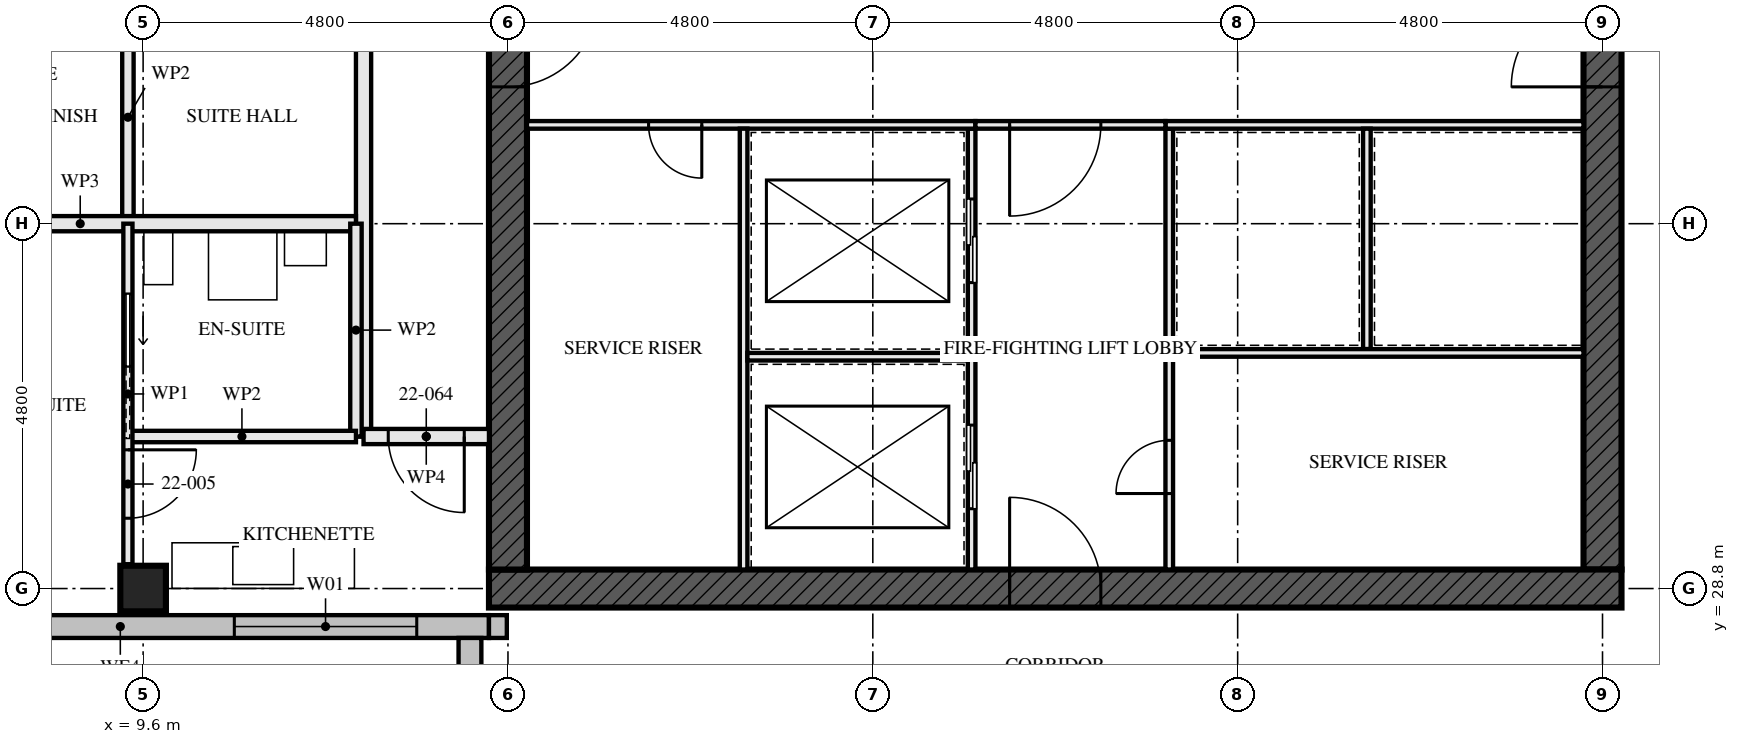
"""IFC4 building model, lengths in metres.
Left out: names, types, materials, properties, quantities, classifications, styles, units other than length and angle.
Written with IfcOpenShell. Run it as: python <this file> out.ifc"""

import sys

from ifc_helpers import new_model, si_unit, direction, frame, frame_2d, origin, origin_2d, place, context, subcontext, project, spatial, rectangle, hollow_rectangle, extrude, element, fill, save


model = new_model("IFC4")
c1 = context("Model", 3, precision=1e-05, world=origin(), true_north=direction((0.0, 1.0)))
c2 = subcontext(c1, "Body", "Model", "MODEL_VIEW")
j1 = project(units=[si_unit("LENGTHUNIT", "METRE"), si_unit("PLANEANGLEUNIT", "RADIAN")], contexts=[c1])
p1 = place(None, origin())
s1 = spatial("IfcSite", under=j1, at=p1, CompositionType="ELEMENT")
p2 = place(p1, origin())
s2 = spatial("IfcBuilding", under=s1, at=p2, CompositionType="ELEMENT")
p3 = place(p2, frame((0.0, 0.0, 84.0)))
s3 = spatial("IfcBuildingStorey", under=s2, at=p3, CompositionType="ELEMENT", Elevation=84.0)
p4 = place(p3, frame((9.6, 28.8, 0.0), z_axis=(0.0, 0.0, 1.0), x_axis=(0.0, 1.0, 0.0)))
e1 = element("IfcColumn", 1, at=p4, inside=s3, PredefinedType="COLUMN", context=c2, shape_type="SweptSolid", body=[
    extrude(hollow_rectangle(XDim=0.6, YDim=0.6, WallThickness=0.08, at=origin_2d()), origin(), (0.0, 0.0, 1.0), 3.5),
])
p5 = place(p3, frame((14.15, 28.8, -0.17), z_axis=(0.0, 0.0, 1.0), x_axis=(1.0, 0.0, 0.0)))
e2 = element("IfcWall", 2, at=p5, inside=s3, PredefinedType="SHEAR", context=c2, shape_type="SweptSolid", body=[
    extrude(rectangle(XDim=14.9, YDim=0.5, at=frame_2d((7.45, 0.0))), origin(), (0.0, 0.0, 1.0), 3.5),
])
p6 = place(p5, frame((6.85, 0.0, 0.17)))
e3 = element("IfcOpeningElement", 3, at=p6, cuts=e2, PredefinedType="OPENING", context=c2, shape_type="SweptSolid", body=[
    extrude(rectangle(XDim=1.2, YDim=2.1, at=frame_2d((0.6, 1.05))), frame((0.0, 0.26, 0.0), z_axis=(0.0, -1.0, 0.0), x_axis=(1.0, 0.0, 0.0)), (0.0, 0.0, 1.0), 0.521),
])
p7 = place(p3, frame((14.4, 42.95, -0.17), z_axis=(0.0, 0.0, 1.0), x_axis=(0.0, -1.0, 0.0)))
e4 = element("IfcWall", 4, at=p7, inside=s3, PredefinedType="SHEAR", context=c2, shape_type="SweptSolid", body=[
    extrude(rectangle(XDim=13.9, YDim=0.5, at=frame_2d((6.95, 0.0))), origin(), (0.0, 0.0, 1.0), 3.5),
])
p8 = place(p7, frame((6.35, 0.0, 0.17)))
e5 = element("IfcOpeningElement", 5, at=p8, cuts=e4, PredefinedType="OPENING", context=c2, shape_type="SweptSolid", body=[
    extrude(rectangle(XDim=1.2, YDim=2.1, at=frame_2d((0.6, 1.05))), frame((0.0, 0.26, 0.0), z_axis=(0.0, -1.0, 0.0), x_axis=(1.0, 0.0, 0.0)), (0.0, 0.0, 1.0), 0.521),
])
p9 = place(p3, frame((28.8, 29.05, -0.17), z_axis=(0.0, 0.0, 1.0), x_axis=(0.0, 1.0, 0.0)))
e6 = element("IfcWall", 6, at=p9, inside=s3, PredefinedType="SHEAR", context=c2, shape_type="SweptSolid", body=[
    extrude(rectangle(XDim=13.9, YDim=0.5, at=frame_2d((6.95, 0.0))), origin(), (0.0, 0.0, 1.0), 3.5),
])
p10 = place(p9, frame((6.35, 0.0, 0.17)))
e7 = element("IfcOpeningElement", 7, at=p10, cuts=e6, PredefinedType="OPENING", context=c2, shape_type="SweptSolid", body=[
    extrude(rectangle(XDim=1.2, YDim=2.1, at=frame_2d((0.6, 1.05))), frame((0.0, 0.26, 0.0), z_axis=(0.0, -1.0, 0.0), x_axis=(1.0, 0.0, 0.0)), (0.0, 0.0, 1.0), 0.521),
])
p11 = place(p3, frame((4.45, 28.3, 0.0), z_axis=(0.0, 0.0, 1.0), x_axis=(1.0, 0.0, 0.0)))
e8 = element("IfcWall", 8, at=p11, inside=s3, PredefinedType="SOLIDWALL", context=c2, shape_type="SweptSolid", body=[
    extrude(rectangle(XDim=9.7, YDim=0.3, at=frame_2d((4.85, 0.0))), origin(), (0.0, 0.0, 1.0), 3.5),
])
p12 = place(p11, frame((2.25, 0.0, 0.0)))
e9 = element("IfcOpeningElement", 9, at=p12, cuts=e8, PredefinedType="OPENING", context=c2, shape_type="SweptSolid", body=[
    extrude(rectangle(XDim=1.0, YDim=2.4, at=frame_2d((0.5, 1.2))), frame((0.0, 0.161, 0.0), z_axis=(0.0, -1.0, 0.0), x_axis=(1.0, 0.0, 0.0)), (0.0, 0.0, 1.0), 0.321),
])
p13 = place(p11, frame((6.35, 0.0, 0.6)))
e10 = element("IfcOpeningElement", 10, at=p13, cuts=e8, PredefinedType="OPENING", context=c2, shape_type="SweptSolid", body=[
    extrude(rectangle(XDim=2.4, YDim=1.8, at=frame_2d((1.2, 0.9))), frame((0.0, 0.161, 0.0), z_axis=(0.0, -1.0, 0.0), x_axis=(1.0, 0.0, 0.0)), (0.0, 0.0, 1.0), 0.321),
])
p14 = place(p3, frame((13.9, 28.15, 0.0), z_axis=(0.0, 0.0, 1.0), x_axis=(0.0, -1.0, 0.0)))
e11 = element("IfcWall", 11, at=p14, inside=s3, PredefinedType="SOLIDWALL", context=c2, shape_type="SweptSolid", body=[
    extrude(rectangle(XDim=9.6, YDim=0.3, at=frame_2d((4.8, 0.0))), origin(), (0.0, 0.0, 1.0), 3.5),
])
p15 = place(p14, frame((6.05, 0.0, 0.0)))
e12 = element("IfcOpeningElement", 12, at=p15, cuts=e11, PredefinedType="OPENING", context=c2, shape_type="SweptSolid", body=[
    extrude(rectangle(XDim=1.0, YDim=2.4, at=frame_2d((0.5, 1.2))), frame((0.0, 0.161, 0.0), z_axis=(0.0, -1.0, 0.0), x_axis=(1.0, 0.0, 0.0)), (0.0, 0.0, 1.0), 0.321),
])
p16 = place(p14, frame((0.55, 0.0, 0.6)))
e13 = element("IfcOpeningElement", 13, at=p16, cuts=e11, PredefinedType="OPENING", context=c2, shape_type="SweptSolid", body=[
    extrude(rectangle(XDim=2.4, YDim=1.8, at=frame_2d((1.2, 0.9))), frame((0.0, 0.161, 0.0), z_axis=(0.0, -1.0, 0.0), x_axis=(1.0, 0.0, 0.0)), (0.0, 0.0, 1.0), 0.321),
])
p17 = place(p3, frame((14.15, 28.3, 2.39), z_axis=(0.0, 0.0, 1.0), x_axis=(1.0, 0.0, 0.0)))
e14 = element("IfcWall", 14, at=p17, inside=s3, PredefinedType="SOLIDWALL", context=c2, shape_type="SweptSolid", body=[
    extrude(rectangle(XDim=0.235, YDim=0.3, at=frame_2d((0.118, 0.0))), origin(), (0.0, 0.0, 1.0), 0.88),
])
p18 = place(p3, frame((9.4, 36.4, 0.0), z_axis=(0.0, 0.0, 1.0), x_axis=(0.0, -1.0, 0.0)))
e15 = element("IfcWall", 15, at=p18, inside=s3, PredefinedType="PARTITIONING", context=c2, shape_type="SweptSolid", body=[
    extrude(rectangle(XDim=2.8, YDim=0.15, at=frame_2d((1.4, 0.0))), origin(), (0.0, 0.0, 1.0), 3.33),
])
p19 = place(p3, frame((5.145, 33.6, 0.0), z_axis=(0.0, 0.0, 1.0), x_axis=(1.0, 0.0, 0.0)))
e16 = element("IfcWall", 16, at=p19, inside=s3, PredefinedType="PARTITIONING", context=c2, shape_type="SweptSolid", body=[
    extrude(rectangle(XDim=7.255, YDim=0.2, at=frame_2d((3.627, 0.0))), origin(), (0.0, 0.0, 1.0), 2.55),
])
p20 = place(p3, frame((9.4, 30.8, 0.0), z_axis=(0.0, 0.0, 1.0), x_axis=(1.0, 0.0, 0.0)))
e17 = element("IfcWall", 17, at=p20, inside=s3, PredefinedType="PARTITIONING", context=c2, shape_type="SweptSolid", body=[
    extrude(rectangle(XDim=3.0, YDim=0.15, at=frame_2d((1.5, 0.0))), origin(), (0.0, 0.0, 1.0), 3.33),
])
p21 = place(p3, frame((12.4, 33.6, 0.0), z_axis=(0.0, 0.0, 1.0), x_axis=(0.0, -1.0, 0.0)))
e18 = element("IfcWall", 18, at=p21, inside=s3, PredefinedType="PARTITIONING", context=c2, shape_type="SweptSolid", body=[
    extrude(rectangle(XDim=2.8, YDim=0.15, at=frame_2d((1.4, 0.0))), origin(), (0.0, 0.0, 1.0), 3.33),
])
p22 = place(p3, frame((9.4, 33.6, 0.0), z_axis=(0.0, 0.0, 1.0), x_axis=(0.0, -1.0, 0.0)))
e19 = element("IfcWall", 19, at=p22, inside=s3, PredefinedType="PARTITIONING", context=c2, shape_type="SweptSolid", body=[
    extrude(rectangle(XDim=4.48, YDim=0.12, at=frame_2d((2.24, 0.0))), origin(), (0.0, 0.0, 1.0), 3.33),
])
p23 = place(p22, frame((2.975, 0.0, 0.0)))
e20 = element("IfcOpeningElement", 20, at=p23, cuts=e19, PredefinedType="OPENING", context=c2, shape_type="SweptSolid", body=[
    extrude(rectangle(XDim=0.9, YDim=2.1, at=frame_2d((0.45, 1.05))), frame((0.0, 0.071, 0.0), z_axis=(0.0, -1.0, 0.0), x_axis=(1.0, 0.0, 0.0)), (0.0, 0.0, 1.0), 0.141),
])
p24 = place(p22, frame((0.925, 0.0, 0.0)))
e21 = element("IfcOpeningElement", 21, at=p24, cuts=e19, PredefinedType="OPENING", context=c2, shape_type="SweptSolid", body=[
    extrude(rectangle(XDim=0.95, YDim=2.1, at=frame_2d((0.475, 1.05))), frame((0.0, 0.071, 0.0), z_axis=(0.0, -1.0, 0.0), x_axis=(1.0, 0.0, 0.0)), (0.0, 0.0, 1.0), 0.141),
])
p25 = place(p3, frame((12.5, 43.2, 0.0), z_axis=(0.0, 0.0, 1.0), x_axis=(0.0, -1.0, 0.0)))
e22 = element("IfcWall", 22, at=p25, inside=s3, PredefinedType="PARTITIONING", context=c2, shape_type="SweptSolid", body=[
    extrude(rectangle(XDim=12.4, YDim=0.2, at=frame_2d((6.2, 0.0))), origin(), (0.0, 0.0, 1.0), 2.55),
])
p26 = place(p25, frame((1.4, 0.0, 0.0)))
e23 = element("IfcOpeningElement", 23, at=p26, cuts=e22, PredefinedType="OPENING", context=c2, shape_type="SweptSolid", body=[
    extrude(rectangle(XDim=1.0, YDim=2.1, at=frame_2d((0.5, 1.05))), frame((0.0, 0.111, 0.0), z_axis=(0.0, -1.0, 0.0), x_axis=(1.0, 0.0, 0.0)), (0.0, 0.0, 1.0), 0.221),
])
p27 = place(p25, frame((5.2, 0.0, 0.0)))
e24 = element("IfcOpeningElement", 24, at=p27, cuts=e22, PredefinedType="OPENING", context=c2, shape_type="SweptSolid", body=[
    extrude(rectangle(XDim=1.0, YDim=2.1, at=frame_2d((0.5, 1.05))), frame((0.0, 0.111, 0.0), z_axis=(0.0, -1.0, 0.0), x_axis=(1.0, 0.0, 0.0)), (0.0, 0.0, 1.0), 0.221),
])
p28 = place(p3, frame((20.5, 29.05, 0.0), z_axis=(0.0, 0.0, 1.0), x_axis=(0.0, 1.0, 0.0)))
e25 = element("IfcWall", 25, at=p28, inside=s3, PredefinedType="SOLIDWALL", context=c2, shape_type="SweptSolid", body=[
    extrude(rectangle(XDim=5.8, YDim=0.1, at=frame_2d((2.9, 0.0))), origin(), (0.0, 0.0, 1.0), 3.33),
])
p29 = place(p28, frame((0.8, 0.0, 0.0)))
e26 = element("IfcOpeningElement", 26, at=p29, cuts=e25, PredefinedType="OPENING", context=c2, shape_type="SweptSolid", body=[
    extrude(rectangle(XDim=1.1, YDim=2.3, at=frame_2d((0.55, 1.15))), frame((0.0, 0.061, 0.0), z_axis=(0.0, -1.0, 0.0), x_axis=(1.0, 0.0, 0.0)), (0.0, 0.0, 1.0), 0.121),
])
p30 = place(p28, frame((3.775, 0.0, 0.0)))
e27 = element("IfcOpeningElement", 27, at=p30, cuts=e25, PredefinedType="OPENING", context=c2, shape_type="SweptSolid", body=[
    extrude(rectangle(XDim=1.1, YDim=2.3, at=frame_2d((0.55, 1.15))), frame((0.0, 0.061, 0.0), z_axis=(0.0, -1.0, 0.0), x_axis=(1.0, 0.0, 0.0)), (0.0, 0.0, 1.0), 0.121),
])
p31 = place(p3, frame((23.1, 29.05, 0.0), z_axis=(0.0, 0.0, 1.0), x_axis=(0.0, 1.0, 0.0)))
e28 = element("IfcWall", 28, at=p31, inside=s3, PredefinedType="SOLIDWALL", context=c2, shape_type="SweptSolid", body=[
    extrude(rectangle(XDim=5.8, YDim=0.1, at=frame_2d((2.9, 0.0))), origin(), (0.0, 0.0, 1.0), 3.33),
])
p32 = place(p31, frame((1.0, 0.0, 0.0)))
e29 = element("IfcOpeningElement", 29, at=p32, cuts=e28, PredefinedType="OPENING", context=c2, shape_type="SweptSolid", body=[
    extrude(rectangle(XDim=0.7, YDim=2.1, at=frame_2d((0.35, 1.05))), frame((0.0, 0.061, 0.0), z_axis=(0.0, -1.0, 0.0), x_axis=(1.0, 0.0, 0.0)), (0.0, 0.0, 1.0), 0.121),
])
p33 = place(p3, frame((14.65, 34.9, 0.0), z_axis=(0.0, 0.0, 1.0), x_axis=(1.0, 0.0, 0.0)))
e30 = element("IfcWall", 30, at=p33, inside=s3, PredefinedType="SOLIDWALL", context=c2, shape_type="SweptSolid", body=[
    extrude(rectangle(XDim=5.9, YDim=0.1, at=frame_2d((2.95, 0.0))), origin(), (0.0, 0.0, 1.0), 3.33),
])
p34 = place(p33, frame((1.6, 0.0, 0.0)))
e31 = element("IfcOpeningElement", 31, at=p34, cuts=e30, PredefinedType="OPENING", context=c2, shape_type="SweptSolid", body=[
    extrude(rectangle(XDim=0.7, YDim=2.1, at=frame_2d((0.35, 1.05))), frame((0.0, 0.061, 0.0), z_axis=(0.0, -1.0, 0.0), x_axis=(1.0, 0.0, 0.0)), (0.0, 0.0, 1.0), 0.121),
])
p35 = place(p3, frame((23.05, 34.9, 0.0), z_axis=(0.0, 0.0, 1.0), x_axis=(1.0, 0.0, 0.0)))
e32 = element("IfcWall", 32, at=p35, inside=s3, PredefinedType="SOLIDWALL", context=c2, shape_type="SweptSolid", body=[
    extrude(rectangle(XDim=5.5, YDim=0.1, at=frame_2d((2.75, 0.0))), origin(), (0.0, 0.0, 1.0), 3.33),
])
p36 = place(p3, frame((20.55, 34.9, 0.0), z_axis=(0.0, 0.0, 1.0), x_axis=(1.0, 0.0, 0.0)))
e33 = element("IfcWall", 33, at=p36, inside=s3, PredefinedType="SOLIDWALL", context=c2, shape_type="SweptSolid", body=[
    extrude(rectangle(XDim=2.5, YDim=0.1, at=frame_2d((1.25, 0.0))), origin(), (0.0, 0.0, 1.0), 3.33),
])
p37 = place(p36, frame((0.45, 0.0, 0.0)))
e34 = element("IfcOpeningElement", 34, at=p37, cuts=e33, PredefinedType="OPENING", context=c2, shape_type="SweptSolid", body=[
    extrude(rectangle(XDim=1.2, YDim=2.1, at=frame_2d((0.6, 1.05))), frame((0.0, 0.061, 0.0), z_axis=(0.0, -1.0, 0.0), x_axis=(1.0, 0.0, 0.0)), (0.0, 0.0, 1.0), 0.121),
])
p38 = place(p3, frame((17.5, 29.05, 0.0), z_axis=(0.0, 0.0, 1.0), x_axis=(0.0, 1.0, 0.0)))
e35 = element("IfcWall", 35, at=p38, inside=s3, PredefinedType="SOLIDWALL", context=c2, shape_type="SweptSolid", body=[
    extrude(rectangle(XDim=5.8, YDim=0.1, at=frame_2d((2.9, 0.0))), origin(), (0.0, 0.0, 1.0), 3.33),
])
p39 = place(p3, frame((17.55, 31.85, 0.0), z_axis=(0.0, 0.0, 1.0), x_axis=(1.0, 0.0, 0.0)))
e36 = element("IfcWall", 36, at=p39, inside=s3, PredefinedType="SOLIDWALL", context=c2, shape_type="SweptSolid", body=[
    extrude(rectangle(XDim=2.9, YDim=0.1, at=frame_2d((1.45, 0.0))), origin(), (0.0, 0.0, 1.0), 3.33),
])
p40 = place(p3, frame((25.7, 31.95, 0.0), z_axis=(0.0, 0.0, 1.0), x_axis=(0.0, 1.0, 0.0)))
e37 = element("IfcWall", 37, at=p40, inside=s3, PredefinedType="SOLIDWALL", context=c2, shape_type="SweptSolid", body=[
    extrude(rectangle(XDim=2.9, YDim=0.1, at=frame_2d((1.45, 0.0))), origin(), (0.0, 0.0, 1.0), 3.33),
])
p41 = place(p3, frame((23.15, 31.9, 0.0), z_axis=(0.0, 0.0, 1.0), x_axis=(1.0, 0.0, 0.0)))
e38 = element("IfcWall", 38, at=p41, inside=s3, PredefinedType="SOLIDWALL", context=c2, shape_type="SweptSolid", body=[
    extrude(rectangle(XDim=5.4, YDim=0.1, at=frame_2d((2.7, 0.0))), origin(), (0.0, 0.0, 1.0), 3.33),
])
p42 = place(p3, frame((12.5, 30.8, 0.0), z_axis=(0.0, 0.0, 1.0), x_axis=(1.0, 0.0, 0.0)))
e39 = element("IfcWall", 39, at=p42, inside=s3, PredefinedType="PARTITIONING", context=c2, shape_type="SweptSolid", body=[
    extrude(rectangle(XDim=1.65, YDim=0.2, at=frame_2d((0.825, 0.0))), origin(), (0.0, 0.0, 1.0), 3.33),
])
p43 = place(p42, frame((0.325, 0.0, 0.0)))
e40 = element("IfcOpeningElement", 40, at=p43, cuts=e39, PredefinedType="OPENING", context=c2, shape_type="SweptSolid", body=[
    extrude(rectangle(XDim=1.0, YDim=2.1, at=frame_2d((0.5, 1.05))), frame((0.0, 0.111, 0.0), z_axis=(0.0, -1.0, 0.0), x_axis=(1.0, 0.0, 0.0)), (0.0, 0.0, 1.0), 0.221),
])
p44 = place(p13, origin())
e41 = element("IfcWindow", 41, at=p44, inside=s3, PartitioningType="SINGLE_PANEL", PredefinedType="WINDOW", context=c2, shape_type="SweptSolid", body=[
    extrude(rectangle(XDim=2.4, YDim=1.8, at=frame_2d((1.2, 0.9))), frame((0.0, 0.03, 0.0), z_axis=(0.0, -1.0, 0.0), x_axis=(1.0, 0.0, 0.0)), (0.0, 0.0, 1.0), 0.06),
])
fill(e10, e41)
p45 = place(p23, origin())
e42 = element("IfcDoor", 42, at=p45, inside=s3, OperationType="SINGLE_SWING_RIGHT", PredefinedType="DOOR", context=c2, shape_type="SweptSolid", body=[
    extrude(rectangle(XDim=0.9, YDim=2.1, at=frame_2d((0.45, 1.05))), frame((0.0, 0.022, 0.0), z_axis=(0.0, -1.0, 0.0), x_axis=(1.0, 0.0, 0.0)), (0.0, 0.0, 1.0), 0.044),
])
fill(e20, e42)
p46 = place(p24, origin())
e43 = element("IfcDoor", 43, at=p46, inside=s3, OperationType="SLIDING_TO_LEFT", PredefinedType="DOOR", context=c2, shape_type="SweptSolid", body=[
    extrude(rectangle(XDim=0.95, YDim=2.1, at=frame_2d((0.475, 1.05))), frame((0.0, 0.022, 0.0), z_axis=(0.0, -1.0, 0.0), x_axis=(1.0, 0.0, 0.0)), (0.0, 0.0, 1.0), 0.044),
])
fill(e21, e43)
p47 = place(p29, origin())
e44 = element("IfcDoor", 44, at=p47, inside=s3, OperationType="SLIDING_TO_LEFT", PredefinedType="DOOR", context=c2, shape_type="SweptSolid", body=[
    extrude(rectangle(XDim=1.1, YDim=2.3, at=frame_2d((0.55, 1.15))), frame((0.0, 0.05, 0.0), z_axis=(0.0, -1.0, 0.0), x_axis=(1.0, 0.0, 0.0)), (0.0, 0.0, 1.0), 0.1),
])
fill(e26, e44)
p48 = place(p30, origin())
e45 = element("IfcDoor", 45, at=p48, inside=s3, OperationType="SLIDING_TO_LEFT", PredefinedType="DOOR", context=c2, shape_type="SweptSolid", body=[
    extrude(rectangle(XDim=1.1, YDim=2.3, at=frame_2d((0.55, 1.15))), frame((0.0, 0.05, 0.0), z_axis=(0.0, -1.0, 0.0), x_axis=(1.0, 0.0, 0.0)), (0.0, 0.0, 1.0), 0.1),
])
fill(e27, e45)
p49 = place(p32, origin())
e46 = element("IfcDoor", 46, at=p49, inside=s3, OperationType="SINGLE_SWING_RIGHT", PredefinedType="DOOR", context=c2, shape_type="SweptSolid", body=[
    extrude(rectangle(XDim=0.7, YDim=2.1, at=frame_2d((0.35, 1.05))), frame((0.0, 0.027, 0.0), z_axis=(0.0, -1.0, 0.0), x_axis=(1.0, 0.0, 0.0)), (0.0, 0.0, 1.0), 0.054),
])
fill(e29, e46)
p50 = place(p34, frame((0.7, 0.0, 0.0), z_axis=(0.0, 0.0, 1.0), x_axis=(-1.0, 0.0, 0.0)))
e47 = element("IfcDoor", 47, at=p50, inside=s3, OperationType="SINGLE_SWING_RIGHT", PredefinedType="DOOR", context=c2, shape_type="SweptSolid", body=[
    extrude(rectangle(XDim=0.7, YDim=2.1, at=frame_2d((0.35, 1.05))), frame((0.0, 0.027, 0.0), z_axis=(0.0, -1.0, 0.0), x_axis=(1.0, 0.0, 0.0)), (0.0, 0.0, 1.0), 0.054),
])
fill(e31, e47)
p51 = place(p37, frame((1.2, 0.0, 0.0), z_axis=(0.0, 0.0, 1.0), x_axis=(-1.0, 0.0, 0.0)))
e48 = element("IfcDoor", 48, at=p51, inside=s3, OperationType="SINGLE_SWING_LEFT", PredefinedType="DOOR", context=c2, shape_type="SweptSolid", body=[
    extrude(rectangle(XDim=1.2, YDim=2.1, at=frame_2d((0.6, 1.05))), frame((0.0, 0.027, 0.0), z_axis=(0.0, -1.0, 0.0), x_axis=(1.0, 0.0, 0.0)), (0.0, 0.0, 1.0), 0.054),
])
fill(e34, e48)
p52 = place(p43, frame((1.0, 0.0, 0.0), z_axis=(0.0, 0.0, 1.0), x_axis=(-1.0, 0.0, 0.0)))
e49 = element("IfcDoor", 49, at=p52, inside=s3, OperationType="SINGLE_SWING_RIGHT", PredefinedType="DOOR", context=c2, shape_type="SweptSolid", body=[
    extrude(rectangle(XDim=1.0, YDim=2.1, at=frame_2d((0.5, 1.05))), frame((0.0, 0.027, 0.0), z_axis=(0.0, -1.0, 0.0), x_axis=(1.0, 0.0, 0.0)), (0.0, 0.0, 1.0), 0.054),
])
fill(e40, e49)
p53 = place(p6, origin())
e50 = element("IfcDoor", 50, at=p53, inside=s3, OperationType="SINGLE_SWING_LEFT", PredefinedType="DOOR", context=c2, shape_type="SweptSolid", body=[
    extrude(rectangle(XDim=1.2, YDim=2.1, at=frame_2d((0.6, 1.05))), frame((0.0, 0.027, 0.0), z_axis=(0.0, -1.0, 0.0), x_axis=(1.0, 0.0, 0.0)), (0.0, 0.0, 1.0), 0.054),
])
fill(e3, e50)
p54 = place(p8, origin())
e51 = element("IfcDoor", 51, at=p54, inside=s3, OperationType="SINGLE_SWING_LEFT", PredefinedType="DOOR", context=c2, shape_type="SweptSolid", body=[
    extrude(rectangle(XDim=1.2, YDim=2.1, at=frame_2d((0.6, 1.05))), frame((0.0, 0.027, 0.0), z_axis=(0.0, -1.0, 0.0), x_axis=(1.0, 0.0, 0.0)), (0.0, 0.0, 1.0), 0.054),
])
fill(e5, e51)
p55 = place(p10, origin())
e52 = element("IfcDoor", 52, at=p55, inside=s3, OperationType="SINGLE_SWING_LEFT", PredefinedType="DOOR", context=c2, shape_type="SweptSolid", body=[
    extrude(rectangle(XDim=1.2, YDim=2.1, at=frame_2d((0.6, 1.05))), frame((0.0, 0.027, 0.0), z_axis=(0.0, -1.0, 0.0), x_axis=(1.0, 0.0, 0.0)), (0.0, 0.0, 1.0), 0.054),
])
fill(e7, e52)
save(model, sys.argv[1])
